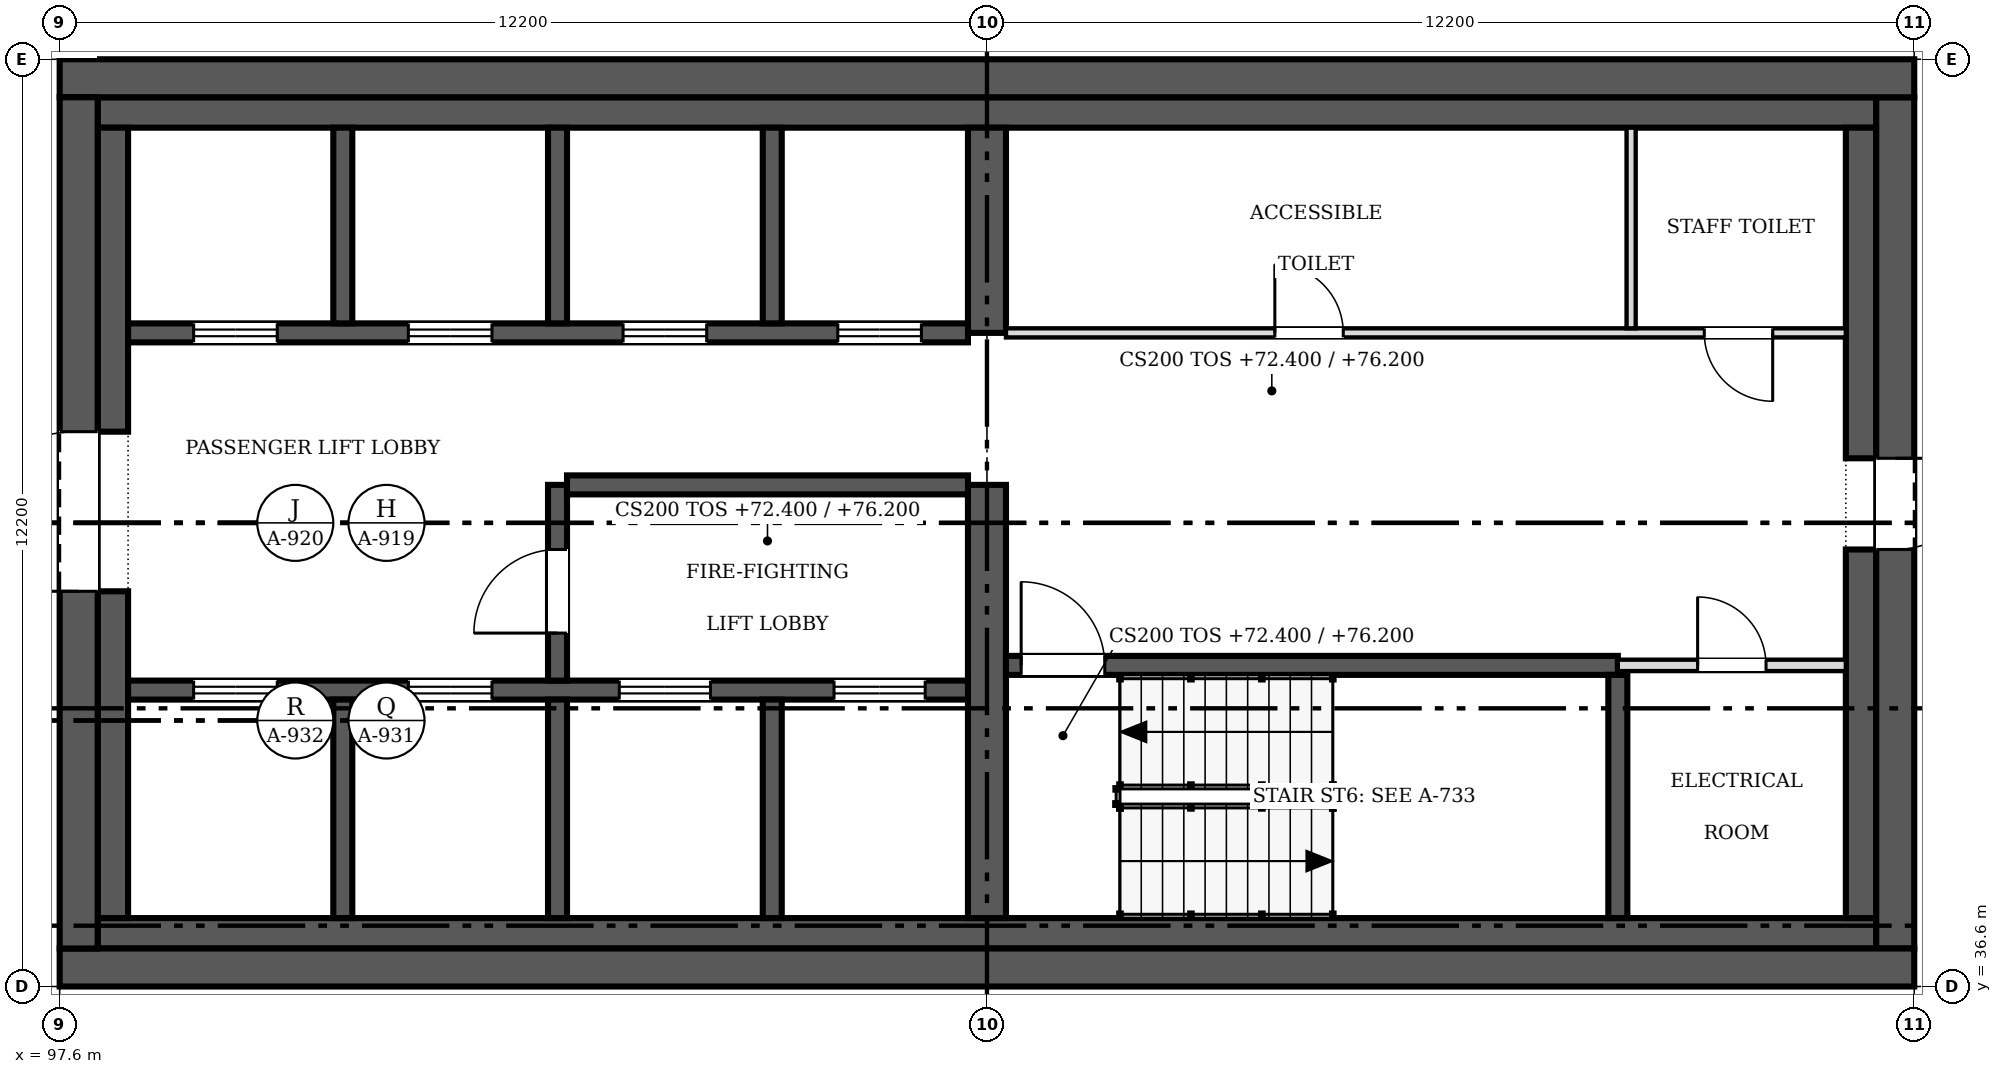
"""IFC4 building model, lengths in metres.
Left out: names, types, materials, properties, quantities, classifications, styles, units other than length and angle.
Written with IfcOpenShell. Run it as: python <this file> out.ifc"""

import sys

from ifc_helpers import new_model, si_unit, direction, frame, frame_2d, origin, place, context, subcontext, project, spatial, rectangle, extrude, source, transform, mapped, element, fill, save


model = new_model("IFC4")
c1 = context("Model", 3, precision=1e-05, world=origin(), true_north=direction((0.0, 1.0)))
c2 = subcontext(c1, "Body", "Model", "MODEL_VIEW")
j1 = project(units=[si_unit("LENGTHUNIT", "METRE"), si_unit("PLANEANGLEUNIT", "RADIAN")], contexts=[c1])
p1 = place(None, origin())
s1 = spatial("IfcSite", under=j1, at=p1, CompositionType="ELEMENT")
p2 = place(p1, origin())
s2 = spatial("IfcBuilding", under=s1, at=p2, CompositionType="ELEMENT")
p3 = place(p2, frame((0.0, 0.0, 72.4)))
s3 = spatial("IfcBuildingStorey", under=s2, at=p3, CompositionType="ELEMENT", Elevation=72.4)
p4 = place(p3, frame((122.0, 36.85, 0.0), z_axis=(0.0, 0.0, 1.0), x_axis=(-1.0, 0.0, 0.0)))
e1 = element("IfcWall", 1, at=p4, inside=s3, PredefinedType="SHEAR", context=c2, shape_type="SweptSolid", body=[
    extrude(rectangle(XDim=24.4, YDim=0.5, at=frame_2d((12.2, 0.0))), origin(), (0.0, 0.0, 1.0), 3.8),
])
p5 = place(p3, frame((97.85, 37.1, 0.0), z_axis=(0.0, 0.0, 1.0), x_axis=(0.0, 1.0, 0.0)))
e2 = element("IfcWall", 2, at=p5, inside=s3, PredefinedType="SHEAR", context=c2, shape_type="SweptSolid", body=[
    extrude(rectangle(XDim=11.2, YDim=0.5, at=frame_2d((5.6, 0.0))), origin(), (0.0, 0.0, 1.0), 3.8),
])
m1 = source(origin(), c2, "Body", "SweptSolid", [
    extrude(rectangle(XDim=2.1, YDim=2.4, at=frame_2d((1.05, 1.2))), frame((0.0, 0.26, 0.0), z_axis=(0.0, -1.0, 0.0), x_axis=(1.0, 0.0, 0.0)), (0.0, 0.0, 1.0), 0.52),
])
p6 = place(p5, frame((4.7, 0.0, 0.0)))
e3 = element("IfcOpeningElement", 3, at=p6, cuts=e2, PredefinedType="OPENING", context=c2, shape_type="MappedRepresentation", body=[
    mapped(m1, transform((0.0, 0.0, 0.0), scale=1.0)),
])
p7 = place(p3, frame((97.6, 48.55, 0.0), z_axis=(0.0, 0.0, 1.0), x_axis=(1.0, 0.0, 0.0)))
e4 = element("IfcWall", 4, at=p7, inside=s3, PredefinedType="SHEAR", context=c2, shape_type="SweptSolid", body=[
    extrude(rectangle(XDim=24.4, YDim=0.5, at=frame_2d((12.2, 0.0))), origin(), (0.0, 0.0, 1.0), 3.8),
])
p8 = place(p3, frame((121.75, 48.3, 0.0), z_axis=(0.0, 0.0, 1.0), x_axis=(0.0, -1.0, 0.0)))
e5 = element("IfcWall", 5, at=p8, inside=s3, PredefinedType="SHEAR", context=c2, shape_type="SweptSolid", body=[
    extrude(rectangle(XDim=11.2, YDim=0.5, at=frame_2d((5.6, 0.0))), origin(), (0.0, 0.0, 1.0), 3.8),
])
m2 = source(origin(), c2, "Body", "SweptSolid", [
    extrude(rectangle(XDim=1.2, YDim=2.1, at=frame_2d((0.6, 1.05))), frame((0.0, 0.26, 0.0), z_axis=(0.0, -1.0, 0.0), x_axis=(1.0, 0.0, 0.0)), (0.0, 0.0, 1.0), 0.52),
])
p9 = place(p8, frame((4.75, 0.0, 0.0)))
e6 = element("IfcOpeningElement", 6, at=p9, cuts=e5, PredefinedType="OPENING", context=c2, shape_type="MappedRepresentation", body=[
    mapped(m2, transform((0.0, 0.0, 0.0), scale=1.0)),
])
for number, where, z_axis, x_axis in (
    (7, (98.1, 37.3, 0.0), (0.0, 0.0, 1.0), (1.0, 0.0, 0.0)),
    (8, (98.1, 48.1, 0.0), (0.0, 0.0, 1.0), (1.0, 0.0, 0.0)),
):
    element("IfcWall", number, at=place(p3, frame(where, z_axis=z_axis, x_axis=x_axis)), inside=s3, PredefinedType="SOLIDWALL", context=c2, shape_type="SweptSolid", body=[
        extrude(rectangle(XDim=23.4, YDim=0.4, at=frame_2d((11.7, 0.0))), origin(), (0.0, 0.0, 1.0), 3.8),
    ])
p10 = place(p3, frame((98.3, 37.5, 0.0), z_axis=(0.0, 0.0, 1.0), x_axis=(0.0, 1.0, 0.0)))
e9 = element("IfcWall", 9, at=p10, inside=s3, PredefinedType="SOLIDWALL", context=c2, shape_type="SweptSolid", body=[
    extrude(rectangle(XDim=4.3, YDim=0.4, at=frame_2d((2.15, 0.0))), origin(), (0.0, 0.0, 1.0), 3.8),
])
p11 = place(p3, frame((98.3, 43.9, 0.0), z_axis=(0.0, 0.0, 1.0), x_axis=(0.0, 1.0, 0.0)))
e10 = element("IfcWall", 10, at=p11, inside=s3, PredefinedType="SOLIDWALL", context=c2, shape_type="SweptSolid", body=[
    extrude(rectangle(XDim=4.0, YDim=0.4, at=frame_2d((2.0, 0.0))), origin(), (0.0, 0.0, 1.0), 3.8),
])
p12 = place(p3, frame((121.3, 37.5, 0.0), z_axis=(0.0, 0.0, 1.0), x_axis=(0.0, 1.0, 0.0)))
e11 = element("IfcWall", 11, at=p12, inside=s3, PredefinedType="SOLIDWALL", context=c2, shape_type="SweptSolid", body=[
    extrude(rectangle(XDim=4.85, YDim=0.4, at=frame_2d((2.425, 0.0))), origin(), (0.0, 0.0, 1.0), 3.8),
])
p13 = place(p3, frame((121.3, 43.55, 0.0), z_axis=(0.0, 0.0, 1.0), x_axis=(0.0, 1.0, 0.0)))
e12 = element("IfcWall", 12, at=p13, inside=s3, PredefinedType="SOLIDWALL", context=c2, shape_type="SweptSolid", body=[
    extrude(rectangle(XDim=4.35, YDim=0.4, at=frame_2d((2.175, 0.0))), origin(), (0.0, 0.0, 1.0), 3.8),
])
p14 = place(p3, frame((109.8, 37.5, 0.0), z_axis=(0.0, 0.0, 1.0), x_axis=(0.0, 1.0, 0.0)))
e13 = element("IfcWall", 13, at=p14, inside=s3, PredefinedType="SHEAR", context=c2, shape_type="SweptSolid", body=[
    extrude(rectangle(XDim=5.7, YDim=0.5, at=frame_2d((2.85, 0.0))), origin(), (0.0, 0.0, 1.0), 3.8),
])
p15 = place(p3, frame((109.8, 45.2, 0.0), z_axis=(0.0, 0.0, 1.0), x_axis=(0.0, 1.0, 0.0)))
e14 = element("IfcWall", 14, at=p15, inside=s3, PredefinedType="SHEAR", context=c2, shape_type="SweptSolid", body=[
    extrude(rectangle(XDim=2.7, YDim=0.5, at=frame_2d((1.35, 0.0))), origin(), (0.0, 0.0, 1.0), 3.8),
])
p16 = place(p3, frame((98.5, 40.5, 0.0), z_axis=(0.0, 0.0, 1.0), x_axis=(1.0, 0.0, 0.0)))
e15 = element("IfcWall", 15, at=p16, inside=s3, PredefinedType="SOLIDWALL", context=c2, shape_type="SweptSolid", body=[
    extrude(rectangle(XDim=11.05, YDim=0.25, at=frame_2d((5.525, 0.0))), origin(), (0.0, 0.0, 1.0), 3.8),
])
m3 = source(origin(), c2, "Body", "SweptSolid", [
    extrude(rectangle(XDim=1.1, YDim=2.1, at=frame_2d((0.55, 1.05))), frame((0.0, 0.135, 0.0), z_axis=(0.0, -1.0, 0.0), x_axis=(1.0, 0.0, 0.0)), (0.0, 0.0, 1.0), 0.27),
])
p17 = place(p16, frame((0.863, 0.0, 0.0)))
e16 = element("IfcOpeningElement", 16, at=p17, cuts=e15, PredefinedType="OPENING", context=c2, shape_type="MappedRepresentation", body=[
    mapped(m3, transform((0.0, 0.0, 0.0), scale=1.0)),
])
p18 = place(p16, frame((3.688, 0.0, 0.0)))
e17 = element("IfcOpeningElement", 17, at=p18, cuts=e15, PredefinedType="OPENING", context=c2, shape_type="MappedRepresentation", body=[
    mapped(m3, transform((0.0, 0.0, 0.0), scale=1.0)),
])
m4 = source(origin(), c2, "Body", "SweptSolid", [
    extrude(rectangle(XDim=1.2, YDim=2.1, at=frame_2d((0.6, 1.05))), frame((0.0, 0.135, 0.0), z_axis=(0.0, -1.0, 0.0), x_axis=(1.0, 0.0, 0.0)), (0.0, 0.0, 1.0), 0.27),
])
p19 = place(p16, frame((6.462, 0.0, 0.0)))
e18 = element("IfcOpeningElement", 18, at=p19, cuts=e15, PredefinedType="OPENING", context=c2, shape_type="MappedRepresentation", body=[
    mapped(m4, transform((0.0, 0.0, 0.0), scale=1.0)),
])
p20 = place(p16, frame((9.288, 0.0, 0.0)))
e19 = element("IfcOpeningElement", 19, at=p20, cuts=e15, PredefinedType="OPENING", context=c2, shape_type="MappedRepresentation", body=[
    mapped(m4, transform((0.0, 0.0, 0.0), scale=1.0)),
])
p21 = place(p3, frame((109.55, 45.2, 0.0), z_axis=(0.0, 0.0, 1.0), x_axis=(-1.0, 0.0, 0.0)))
e20 = element("IfcWall", 20, at=p21, inside=s3, PredefinedType="SOLIDWALL", context=c2, shape_type="SweptSolid", body=[
    extrude(rectangle(XDim=11.05, YDim=0.25, at=frame_2d((5.525, 0.0))), origin(), (0.0, 0.0, 1.0), 3.8),
])
p22 = place(p21, frame((9.087, 0.0, 0.0)))
e21 = element("IfcOpeningElement", 21, at=p22, cuts=e20, PredefinedType="OPENING", context=c2, shape_type="MappedRepresentation", body=[
    mapped(m3, transform((0.0, 0.0, 0.0), scale=1.0)),
])
p23 = place(p21, frame((6.262, 0.0, 0.0)))
e22 = element("IfcOpeningElement", 22, at=p23, cuts=e20, PredefinedType="OPENING", context=c2, shape_type="MappedRepresentation", body=[
    mapped(m3, transform((0.0, 0.0, 0.0), scale=1.0)),
])
p24 = place(p21, frame((3.438, 0.0, 0.0)))
e23 = element("IfcOpeningElement", 23, at=p24, cuts=e20, PredefinedType="OPENING", context=c2, shape_type="MappedRepresentation", body=[
    mapped(m3, transform((0.0, 0.0, 0.0), scale=1.0)),
])
p25 = place(p21, frame((0.613, 0.0, 0.0)))
e24 = element("IfcOpeningElement", 24, at=p25, cuts=e20, PredefinedType="OPENING", context=c2, shape_type="MappedRepresentation", body=[
    mapped(m3, transform((0.0, 0.0, 0.0), scale=1.0)),
])
p26 = place(p3, frame((118.1, 40.825, 0.0), z_axis=(0.0, 0.0, 1.0), x_axis=(-1.0, 0.0, 0.0)))
e25 = element("IfcWall", 25, at=p26, inside=s3, PredefinedType="SOLIDWALL", context=c2, shape_type="SweptSolid", body=[
    extrude(rectangle(XDim=8.05, YDim=0.25, at=frame_2d((4.025, 0.0))), origin(), (0.0, 0.0, 1.0), 3.8),
])
p27 = place(p26, frame((6.75, 0.0, 0.0)))
e26 = element("IfcOpeningElement", 26, at=p27, cuts=e25, PredefinedType="OPENING", context=c2, shape_type="MappedRepresentation", body=[
    mapped(m3, transform((0.0, 0.0, 0.0), scale=1.0)),
])
p28 = place(p3, frame((104.15, 37.5, 0.0), z_axis=(0.0, 0.0, 1.0), x_axis=(0.0, 1.0, 0.0)))
e27 = element("IfcWall", 27, at=p28, inside=s3, PredefinedType="SOLIDWALL", context=c2, shape_type="SweptSolid", body=[
    extrude(rectangle(XDim=2.875, YDim=0.25, at=frame_2d((1.438, 0.0))), origin(), (0.0, 0.0, 1.0), 3.8),
])
p29 = place(p3, frame((104.15, 43.2, 0.0), z_axis=(0.0, 0.0, 1.0), x_axis=(0.0, -1.0, 0.0)))
e28 = element("IfcWall", 28, at=p29, inside=s3, PredefinedType="SOLIDWALL", context=c2, shape_type="SweptSolid", body=[
    extrude(rectangle(XDim=2.575, YDim=0.25, at=frame_2d((1.288, 0.0))), origin(), (0.0, 0.0, 1.0), 3.8),
])
p30 = place(p29, frame((0.85, 0.0, 0.0)))
e29 = element("IfcOpeningElement", 29, at=p30, cuts=e28, PredefinedType="OPENING", context=c2, shape_type="MappedRepresentation", body=[
    mapped(m3, transform((0.0, 0.0, 0.0), scale=1.0)),
])
p31 = place(p3, frame((104.275, 43.2, 0.0), z_axis=(0.0, 0.0, 1.0), x_axis=(1.0, 0.0, 0.0)))
e30 = element("IfcWall", 30, at=p31, inside=s3, PredefinedType="SOLIDWALL", context=c2, shape_type="SweptSolid", body=[
    extrude(rectangle(XDim=5.275, YDim=0.25, at=frame_2d((2.638, 0.0))), origin(), (0.0, 0.0, 1.0), 3.8),
])
p32 = place(p3, frame((118.1, 37.5, 0.0), z_axis=(0.0, 0.0, 1.0), x_axis=(0.0, 1.0, 0.0)))
e31 = element("IfcWall", 31, at=p32, inside=s3, PredefinedType="SOLIDWALL", context=c2, shape_type="SweptSolid", body=[
    extrude(rectangle(XDim=3.2, YDim=0.25, at=frame_2d((1.6, 0.0))), origin(), (0.0, 0.0, 1.0), 3.8),
])
for number, where, z_axis, x_axis in (
    (32, (101.325, 37.5, 0.0), (0.0, 0.0, 1.0), (0.0, 1.0, 0.0)),
    (33, (106.975, 37.5, 0.0), (0.0, 0.0, 1.0), (0.0, 1.0, 0.0)),
):
    element("IfcWall", number, at=place(p3, frame(where, z_axis=z_axis, x_axis=x_axis)), inside=s3, PredefinedType="SOLIDWALL", context=c2, shape_type="SweptSolid", body=[
        extrude(rectangle(XDim=2.875, YDim=0.25, at=frame_2d((1.438, 0.0))), origin(), (0.0, 0.0, 1.0), 3.8),
    ])
for number, where, z_axis, x_axis in (
    (34, (101.325, 45.325, 0.0), (0.0, 0.0, 1.0), (0.0, 1.0, 0.0)),
    (35, (104.15, 45.325, 0.0), (0.0, 0.0, 1.0), (0.0, 1.0, 0.0)),
    (36, (106.975, 45.325, 0.0), (0.0, 0.0, 1.0), (0.0, 1.0, 0.0)),
):
    element("IfcWall", number, at=place(p3, frame(where, z_axis=z_axis, x_axis=x_axis)), inside=s3, PredefinedType="SOLIDWALL", context=c2, shape_type="SweptSolid", body=[
        extrude(rectangle(XDim=2.575, YDim=0.25, at=frame_2d((1.288, 0.0))), origin(), (0.0, 0.0, 1.0), 3.8),
    ])
p33 = place(p3, frame((110.05, 45.2, 0.0), z_axis=(0.0, 0.0, 1.0), x_axis=(1.0, 0.0, 0.0)))
e37 = element("IfcWall", 37, at=p33, inside=s3, PredefinedType="PARTITIONING", context=c2, shape_type="SweptSolid", body=[
    extrude(rectangle(XDim=11.05, YDim=0.12, at=frame_2d((5.525, 0.0))), origin(), (0.0, 0.0, 1.0), 3.6),
])
m5 = source(origin(), c2, "Body", "SweptSolid", [
    extrude(rectangle(XDim=0.9, YDim=2.1, at=frame_2d((0.45, 1.05))), frame((0.0, 0.07, 0.0), z_axis=(0.0, -1.0, 0.0), x_axis=(1.0, 0.0, 0.0)), (0.0, 0.0, 1.0), 0.14),
])
p34 = place(p33, frame((3.538, 0.0, 0.0)))
e38 = element("IfcOpeningElement", 38, at=p34, cuts=e37, PredefinedType="OPENING", context=c2, shape_type="MappedRepresentation", body=[
    mapped(m5, transform((0.0, 0.0, 0.0), scale=1.0)),
])
p35 = place(p33, frame((9.188, 0.0, 0.0)))
e39 = element("IfcOpeningElement", 39, at=p35, cuts=e37, PredefinedType="OPENING", context=c2, shape_type="MappedRepresentation", body=[
    mapped(m5, transform((0.0, 0.0, 0.0), scale=1.0)),
])
p36 = place(p3, frame((121.1, 40.825, 0.0), z_axis=(0.0, 0.0, 1.0), x_axis=(-1.0, 0.0, 0.0)))
e40 = element("IfcWall", 40, at=p36, inside=s3, PredefinedType="PARTITIONING", context=c2, shape_type="SweptSolid", body=[
    extrude(rectangle(XDim=3.0, YDim=0.15, at=frame_2d((1.5, 0.0))), origin(), (0.0, 0.0, 1.0), 3.6),
])
m6 = source(origin(), c2, "Body", "SweptSolid", [
    extrude(rectangle(XDim=0.9, YDim=2.1, at=frame_2d((0.45, 1.05))), frame((0.0, 0.085, 0.0), z_axis=(0.0, -1.0, 0.0), x_axis=(1.0, 0.0, 0.0)), (0.0, 0.0, 1.0), 0.17),
])
p37 = place(p36, frame((1.05, 0.0, 0.0)))
e41 = element("IfcOpeningElement", 41, at=p37, cuts=e40, PredefinedType="OPENING", context=c2, shape_type="MappedRepresentation", body=[
    mapped(m6, transform((0.0, 0.0, 0.0), scale=1.0)),
])
p38 = place(p3, frame((118.275, 45.26, 0.0), z_axis=(0.0, 0.0, 1.0), x_axis=(0.0, 1.0, 0.0)))
e42 = element("IfcWall", 42, at=p38, inside=s3, PredefinedType="PARTITIONING", context=c2, shape_type="SweptSolid", body=[
    extrude(rectangle(XDim=2.64, YDim=0.12, at=frame_2d((1.32, 0.0))), origin(), (0.0, 0.0, 1.0), 3.6),
])
m7 = source(origin(), c2, "Body", "SweptSolid", [
    extrude(rectangle(XDim=2.1, YDim=2.4, at=frame_2d((1.05, 1.2))), frame((0.0, 0.025, 0.0), z_axis=(0.0, -1.0, 0.0), x_axis=(1.0, 0.0, 0.0)), (0.0, 0.0, 1.0), 0.05),
])
p39 = place(p6, origin())
e43 = element("IfcDoor", 43, at=p39, inside=s3, OperationType="DOUBLE_DOOR_SINGLE_SWING", PredefinedType="DOOR", context=c2, shape_type="MappedRepresentation", body=[
    mapped(m7, transform((0.0, 0.0, 0.0), scale=1.0)),
])
fill(e3, e43)
m8 = source(origin(), c2, "Body", "SweptSolid", [
    extrude(rectangle(XDim=1.2, YDim=2.1, at=frame_2d((0.6, 1.05))), frame((0.0, 0.025, 0.0), z_axis=(0.0, -1.0, 0.0), x_axis=(1.0, 0.0, 0.0)), (0.0, 0.0, 1.0), 0.05),
])
p40 = place(p9, origin())
e44 = element("IfcDoor", 44, at=p40, inside=s3, OperationType="SINGLE_SWING_LEFT", PredefinedType="DOOR", context=c2, shape_type="MappedRepresentation", body=[
    mapped(m8, transform((0.0, 0.0, 0.0), scale=1.0)),
])
fill(e6, e44)
m9 = source(origin(), c2, "Body", "SweptSolid", [
    extrude(rectangle(XDim=1.1, YDim=2.1, at=frame_2d((0.55, 1.05))), frame((0.0, 0.025, 0.0), z_axis=(0.0, -1.0, 0.0), x_axis=(1.0, 0.0, 0.0)), (0.0, 0.0, 1.0), 0.05),
])
p41 = place(p17, origin())
e45 = element("IfcDoor", 45, at=p41, inside=s3, OperationType="DOUBLE_DOOR_SLIDING", PredefinedType="DOOR", context=c2, shape_type="MappedRepresentation", body=[
    mapped(m9, transform((0.0, 0.0, 0.0), scale=1.0)),
])
fill(e16, e45)
p42 = place(p18, origin())
e46 = element("IfcDoor", 46, at=p42, inside=s3, OperationType="DOUBLE_DOOR_SLIDING", PredefinedType="DOOR", context=c2, shape_type="MappedRepresentation", body=[
    mapped(m9, transform((0.0, 0.0, 0.0), scale=1.0)),
])
fill(e17, e46)
p43 = place(p19, origin())
e47 = element("IfcDoor", 47, at=p43, inside=s3, OperationType="DOUBLE_DOOR_SLIDING", PredefinedType="DOOR", context=c2, shape_type="MappedRepresentation", body=[
    mapped(m8, transform((0.0, 0.0, 0.0), scale=1.0)),
])
fill(e18, e47)
p44 = place(p20, origin())
e48 = element("IfcDoor", 48, at=p44, inside=s3, OperationType="DOUBLE_DOOR_SLIDING", PredefinedType="DOOR", context=c2, shape_type="MappedRepresentation", body=[
    mapped(m8, transform((0.0, 0.0, 0.0), scale=1.0)),
])
fill(e19, e48)
p45 = place(p22, origin())
e49 = element("IfcDoor", 49, at=p45, inside=s3, OperationType="DOUBLE_DOOR_SLIDING", PredefinedType="DOOR", context=c2, shape_type="MappedRepresentation", body=[
    mapped(m9, transform((0.0, 0.0, 0.0), scale=1.0)),
])
fill(e21, e49)
p46 = place(p23, origin())
e50 = element("IfcDoor", 50, at=p46, inside=s3, OperationType="DOUBLE_DOOR_SLIDING", PredefinedType="DOOR", context=c2, shape_type="MappedRepresentation", body=[
    mapped(m9, transform((0.0, 0.0, 0.0), scale=1.0)),
])
fill(e22, e50)
p47 = place(p24, origin())
e51 = element("IfcDoor", 51, at=p47, inside=s3, OperationType="DOUBLE_DOOR_SLIDING", PredefinedType="DOOR", context=c2, shape_type="MappedRepresentation", body=[
    mapped(m9, transform((0.0, 0.0, 0.0), scale=1.0)),
])
fill(e23, e51)
p48 = place(p25, origin())
e52 = element("IfcDoor", 52, at=p48, inside=s3, OperationType="DOUBLE_DOOR_SLIDING", PredefinedType="DOOR", context=c2, shape_type="MappedRepresentation", body=[
    mapped(m9, transform((0.0, 0.0, 0.0), scale=1.0)),
])
fill(e24, e52)
p49 = place(p27, origin())
e53 = element("IfcDoor", 53, at=p49, inside=s3, OperationType="SINGLE_SWING_RIGHT", PredefinedType="DOOR", context=c2, shape_type="MappedRepresentation", body=[
    mapped(m9, transform((0.0, 0.0, 0.0), scale=1.0)),
])
fill(e26, e53)
p50 = place(p30, origin())
e54 = element("IfcDoor", 54, at=p50, inside=s3, OperationType="SINGLE_SWING_RIGHT", PredefinedType="DOOR", context=c2, shape_type="MappedRepresentation", body=[
    mapped(m9, transform((0.0, 0.0, 0.0), scale=1.0)),
])
fill(e29, e54)
m10 = source(origin(), c2, "Body", "SweptSolid", [
    extrude(rectangle(XDim=0.9, YDim=2.1, at=frame_2d((0.45, 1.05))), frame((0.0, 0.025, 0.0), z_axis=(0.0, -1.0, 0.0), x_axis=(1.0, 0.0, 0.0)), (0.0, 0.0, 1.0), 0.05),
])
p51 = place(p34, origin())
e55 = element("IfcDoor", 55, at=p51, inside=s3, OperationType="SINGLE_SWING_LEFT", PredefinedType="DOOR", context=c2, shape_type="MappedRepresentation", body=[
    mapped(m10, transform((0.0, 0.0, 0.0), scale=1.0)),
])
fill(e38, e55)
p52 = place(p35, origin())
e56 = element("IfcDoor", 56, at=p52, inside=s3, OperationType="SINGLE_SWING_RIGHT", PredefinedType="DOOR", context=c2, shape_type="MappedRepresentation", body=[
    mapped(m10, transform((0.0, 0.0, 0.0), scale=1.0)),
])
fill(e39, e56)
p53 = place(p37, origin())
e57 = element("IfcDoor", 57, at=p53, inside=s3, OperationType="SINGLE_SWING_RIGHT", PredefinedType="DOOR", context=c2, shape_type="MappedRepresentation", body=[
    mapped(m10, transform((0.0, 0.0, 0.0), scale=1.0)),
])
fill(e41, e57)
save(model, sys.argv[1])
